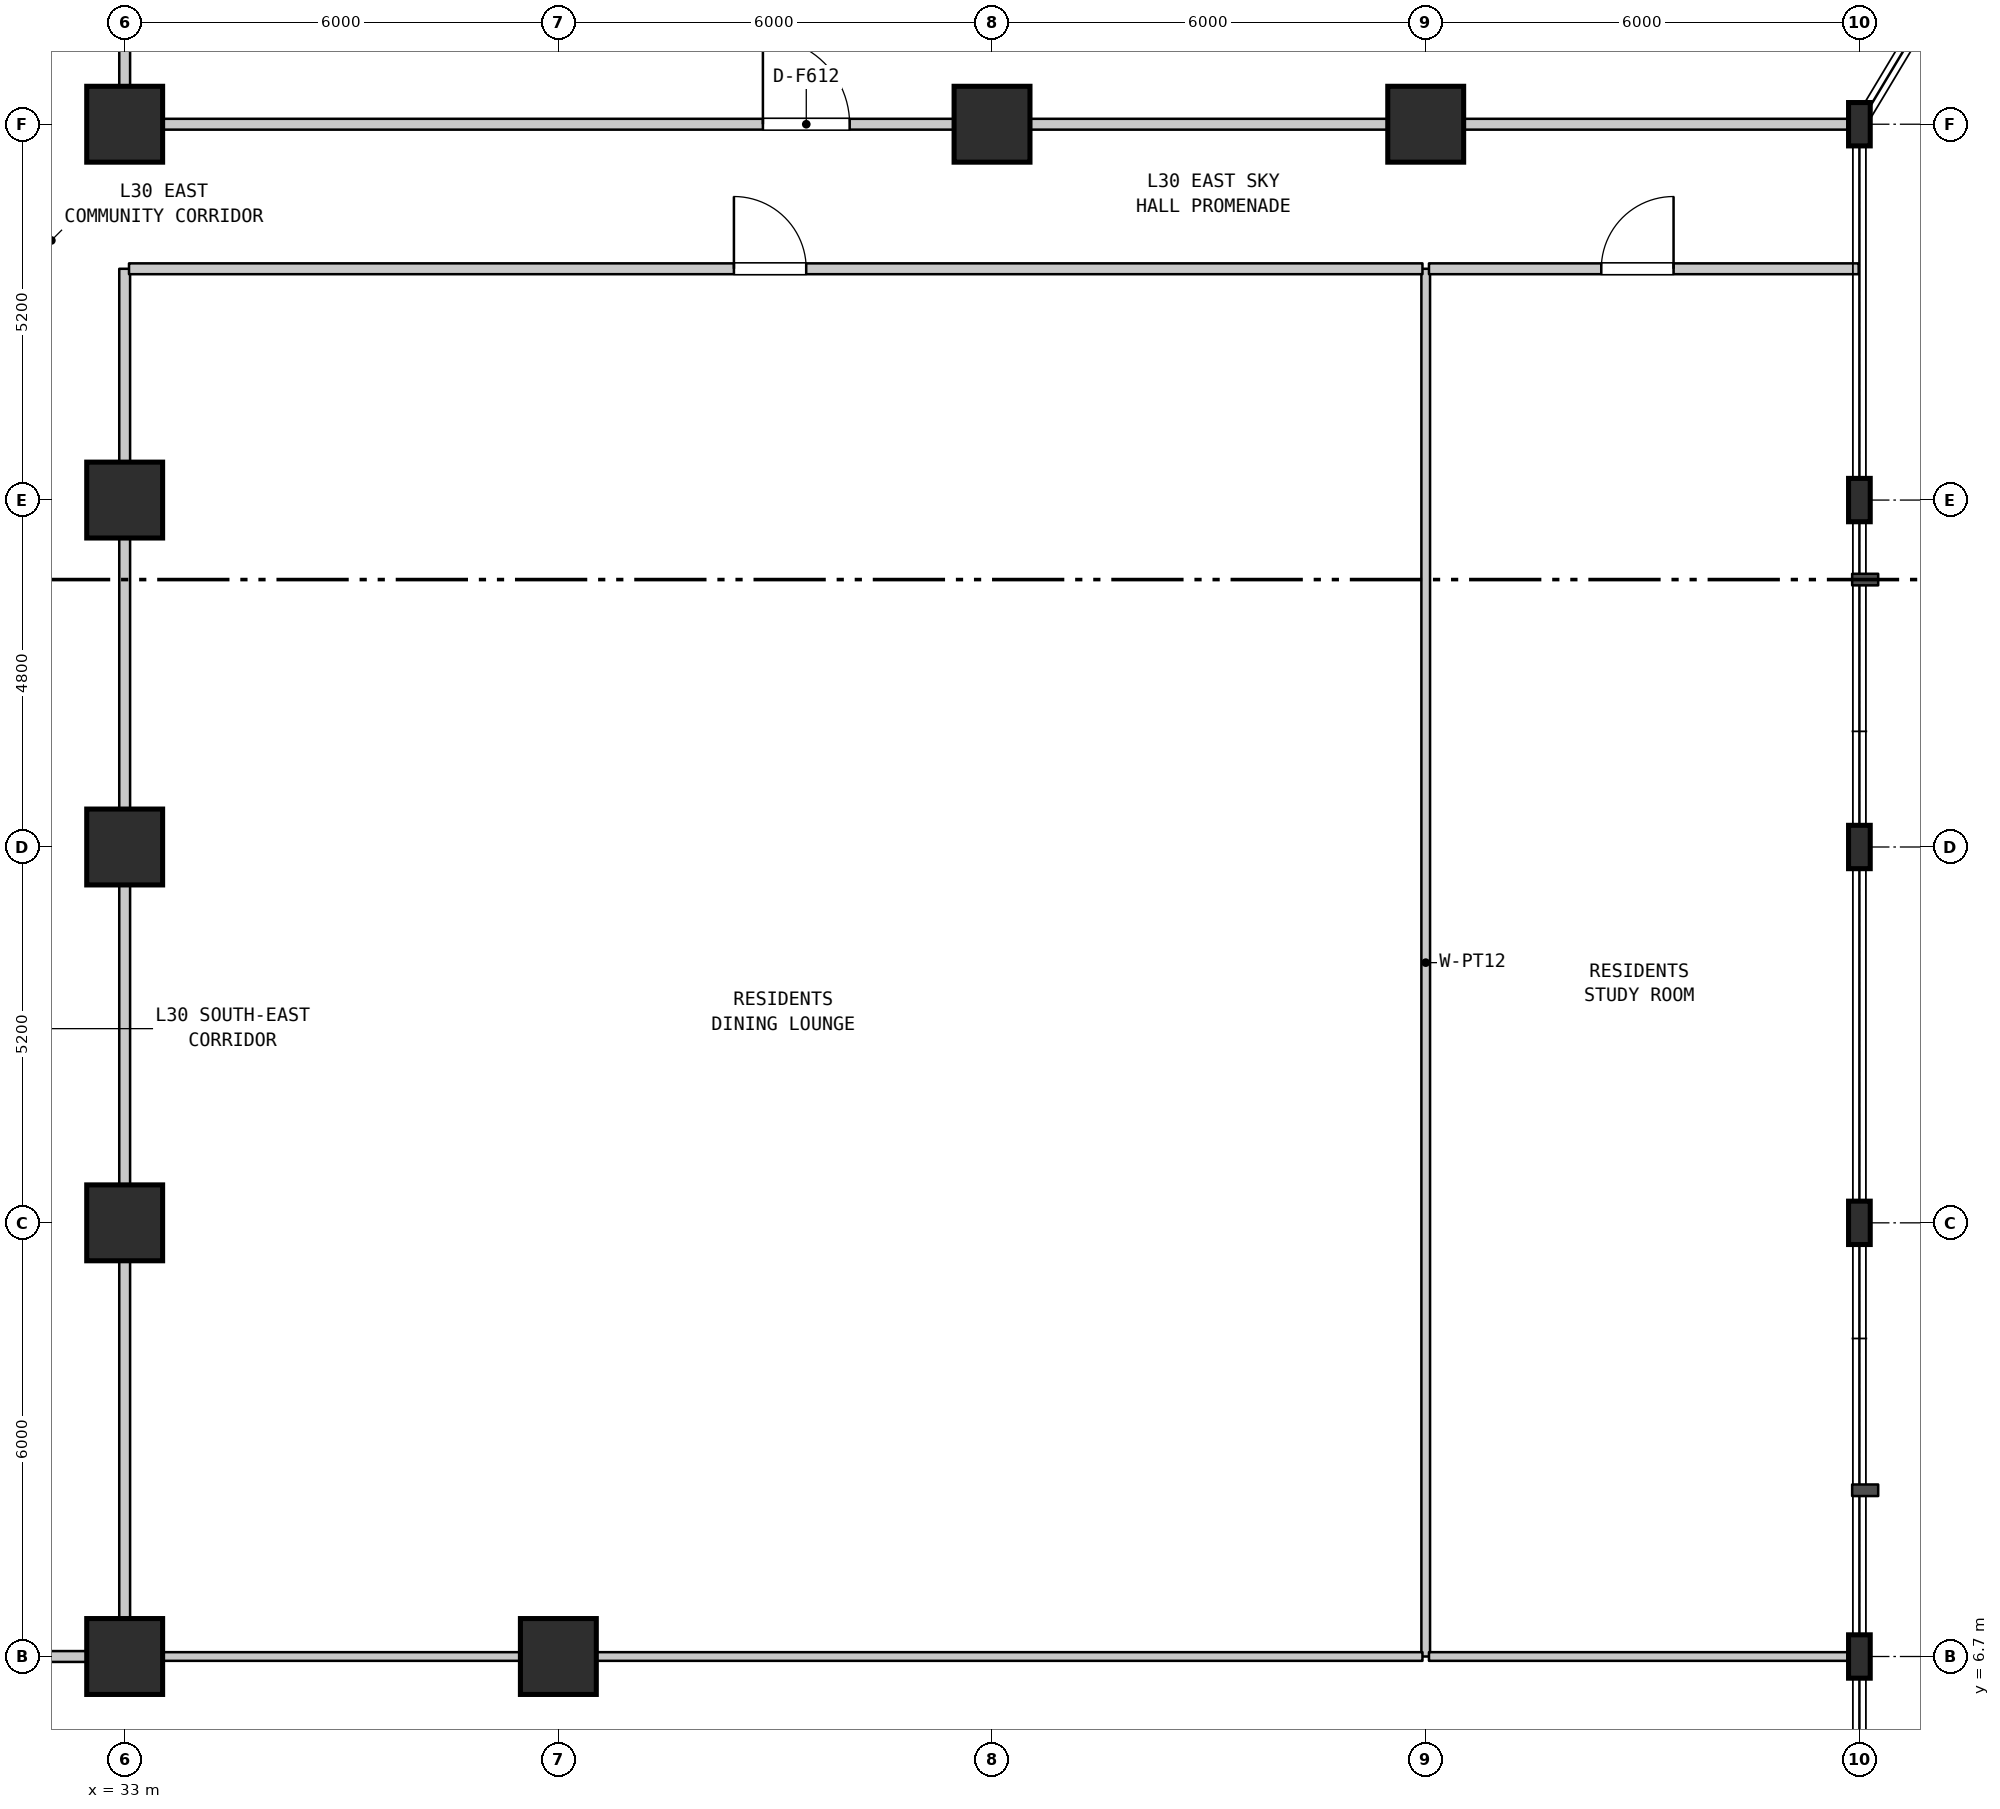
"""IFC4 building model, lengths in metres.
Left out: names, types, materials, properties, quantities, classifications, styles, units other than length and angle.
Written with IfcOpenShell. Run it as: python <this file> out.ifc"""

import sys

from ifc_helpers import new_model, si_unit, direction, frame, frame_2d, origin, origin_2d, place, context, subcontext, project, spatial, rectangle, i_section, extrude, element, fill, save


model = new_model("IFC4")
c1 = context("Model", 3, precision=1e-05, world=origin(), true_north=direction((0.0, 1.0)))
c2 = subcontext(c1, "Body", "Model", "MODEL_VIEW")
j1 = project(units=[si_unit("LENGTHUNIT", "METRE"), si_unit("PLANEANGLEUNIT", "RADIAN")], contexts=[c1])
p1 = place(None, origin())
s1 = spatial("IfcSite", under=j1, at=p1, CompositionType="ELEMENT")
p2 = place(p1, origin())
s2 = spatial("IfcBuilding", under=s1, at=p2, CompositionType="ELEMENT")
p3 = place(p2, frame((0.0, 0.0, 125.3)))
s3 = spatial("IfcBuildingStorey", under=s2, at=p3, CompositionType="ELEMENT", Elevation=125.3)
for number, where, z_axis, x_axis in (
    (1, (33.0, 6.7, 0.0), (0.0, 0.0, 1.0), (1.0, 0.0, 0.0)),
    (2, (33.0, 12.7, 0.0), (0.0, 0.0, 1.0), (1.0, 0.0, 0.0)),
    (3, (33.0, 17.9, 0.0), (0.0, 0.0, 1.0), (1.0, 0.0, 0.0)),
    (4, (33.0, 22.7, 0.0), (0.0, 0.0, 1.0), (1.0, 0.0, 0.0)),
    (5, (33.0, 27.9, 0.0), (0.0, 0.0, 1.0), (1.0, 0.0, 0.0)),
    (6, (39.0, 6.7, 0.0), (0.0, 0.0, 1.0), (1.0, 0.0, 0.0)),
    (7, (45.0, 27.9, 0.0), (0.0, 0.0, 1.0), (1.0, 0.0, 0.0)),
    (8, (51.0, 27.9, 0.0), (0.0, 0.0, 1.0), (1.0, 0.0, 0.0)),
):
    element("IfcColumn", number, at=place(p3, frame(where, z_axis=z_axis, x_axis=x_axis)), inside=s3, PredefinedType="COLUMN", context=c2, shape_type="SweptSolid", body=[
        extrude(rectangle(XDim=1.05, YDim=1.05, at=origin_2d()), origin(), (0.0, 0.0, 1.0), 4.5),
    ])
for number, where, z_axis, x_axis in (
    (9, (57.0, 6.7, 0.0), (0.0, 0.0, 1.0), (1.0, 0.0, 0.0)),
    (10, (57.0, 12.7, 0.0), (0.0, 0.0, 1.0), (1.0, 0.0, 0.0)),
    (11, (57.0, 17.9, 0.0), (0.0, 0.0, 1.0), (1.0, 0.0, 0.0)),
    (12, (57.0, 22.7, 0.0), (0.0, 0.0, 1.0), (1.0, 0.0, 0.0)),
    (13, (57.0, 27.9, 0.0), (0.0, 0.0, 1.0), (1.0, 0.0, 0.0)),
):
    element("IfcColumn", number, at=place(p3, frame(where, z_axis=z_axis, x_axis=x_axis)), inside=s3, PredefinedType="COLUMN", context=c2, shape_type="SweptSolid", body=[
        extrude(i_section(OverallWidth=0.3, OverallDepth=0.6, WebThickness=0.015, FlangeThickness=0.03, FilletRadius=0.027, at=origin_2d()), origin(), (0.0, 0.0, 1.0), 4.5),
    ])
p4 = place(p3, frame((33.0, 6.7, 0.0), z_axis=(0.0, 0.0, 1.0), x_axis=(0.0, 1.0, 0.0)))
e14 = element("IfcWall", 14, at=p4, inside=s3, PredefinedType="STANDARD", context=c2, shape_type="SweptSolid", body=[
    extrude(rectangle(XDim=19.2, YDim=0.15, at=frame_2d((9.6, 0.0))), origin(), (0.0, 0.0, 1.0), 3.735),
])
p5 = place(p3, frame((33.0, 27.9, 0.0), z_axis=(0.0, 0.0, 1.0), x_axis=(0.0, 1.0, 0.0)))
e15 = element("IfcWall", 15, at=p5, inside=s3, PredefinedType="STANDARD", context=c2, shape_type="SweptSolid", body=[
    extrude(rectangle(XDim=10.0, YDim=0.15, at=frame_2d((5.0, 0.0))), origin(), (0.0, 0.0, 1.0), 3.685),
])
p6 = place(p3, frame((51.0, 6.7, 0.0), z_axis=(0.0, 0.0, 1.0), x_axis=(0.0, 1.0, 0.0)))
e16 = element("IfcWall", 16, at=p6, inside=s3, PredefinedType="PARTITIONING", context=c2, shape_type="SweptSolid", body=[
    extrude(rectangle(XDim=19.2, YDim=0.12, at=frame_2d((9.6, 0.0))), origin(), (0.0, 0.0, 1.0), 4.185),
])
p7 = place(p3, frame((21.01, 6.7, 0.0), z_axis=(0.0, 0.0, 1.0), x_axis=(1.0, 0.0, 0.0)))
e17 = element("IfcWall", 17, at=p7, inside=s3, PredefinedType="STANDARD", context=c2, shape_type="SweptSolid", body=[
    extrude(rectangle(XDim=11.93, YDim=0.15, at=frame_2d((5.965, 0.0))), origin(), (0.0, 0.0, 1.0), 3.735),
])
p8 = place(p7, frame((4.325, 0.0, 0.0)))
e18 = element("IfcOpeningElement", 18, at=p8, cuts=e17, PredefinedType="OPENING", context=c2, shape_type="SweptSolid", body=[
    extrude(rectangle(XDim=1.0, YDim=2.15, at=frame_2d((0.5, 1.075))), frame((0.0, 0.085, 0.0), z_axis=(0.0, -1.0, 0.0), x_axis=(1.0, 0.0, 0.0)), (0.0, 0.0, 1.0), 0.17),
])
p9 = place(p3, frame((33.06, 6.7, 0.0), z_axis=(0.0, 0.0, 1.0), x_axis=(1.0, 0.0, 0.0)))
e19 = element("IfcWall", 19, at=p9, inside=s3, PredefinedType="PARTITIONING", context=c2, shape_type="SweptSolid", body=[
    extrude(rectangle(XDim=5.94, YDim=0.12, at=frame_2d((2.97, 0.0))), origin(), (0.0, 0.0, 1.0), 3.735),
])
p10 = place(p3, frame((51.045, 6.7, 0.0), z_axis=(0.0, 0.0, 1.0), x_axis=(1.0, 0.0, 0.0)))
e20 = element("IfcWall", 20, at=p10, inside=s3, PredefinedType="PARTITIONING", context=c2, shape_type="SweptSolid", body=[
    extrude(rectangle(XDim=5.945, YDim=0.12, at=frame_2d((2.973, 0.0))), origin(), (0.0, 0.0, 1.0), 3.585),
])
p11 = place(p3, frame((33.06, 25.9, 0.0), z_axis=(0.0, 0.0, 1.0), x_axis=(1.0, 0.0, 0.0)))
e21 = element("IfcWall", 21, at=p11, inside=s3, PredefinedType="STANDARD", context=c2, shape_type="SweptSolid", body=[
    extrude(rectangle(XDim=17.895, YDim=0.15, at=frame_2d((8.948, 0.0))), origin(), (0.0, 0.0, 1.0), 4.185),
])
p12 = place(p11, frame((8.369, 0.0, 0.0)))
e22 = element("IfcOpeningElement", 22, at=p12, cuts=e21, PredefinedType="OPENING", context=c2, shape_type="SweptSolid", body=[
    extrude(rectangle(XDim=1.0, YDim=2.15, at=frame_2d((0.5, 1.075))), frame((0.0, 0.085, 0.0), z_axis=(0.0, -1.0, 0.0), x_axis=(1.0, 0.0, 0.0)), (0.0, 0.0, 1.0), 0.17),
])
p13 = place(p3, frame((51.045, 25.9, 0.0), z_axis=(0.0, 0.0, 1.0), x_axis=(1.0, 0.0, 0.0)))
e23 = element("IfcWall", 23, at=p13, inside=s3, PredefinedType="STANDARD", context=c2, shape_type="SweptSolid", body=[
    extrude(rectangle(XDim=5.945, YDim=0.15, at=frame_2d((2.973, 0.0))), origin(), (0.0, 0.0, 1.0), 4.185),
])
p14 = place(p13, frame((2.384, 0.0, 0.0)))
e24 = element("IfcOpeningElement", 24, at=p14, cuts=e23, PredefinedType="OPENING", context=c2, shape_type="SweptSolid", body=[
    extrude(rectangle(XDim=1.0, YDim=2.15, at=frame_2d((0.5, 1.075))), frame((0.0, 0.085, 0.0), z_axis=(0.0, -1.0, 0.0), x_axis=(1.0, 0.0, 0.0)), (0.0, 0.0, 1.0), 0.17),
])
p15 = place(p3, frame((33.06, 27.9, 0.0), z_axis=(0.0, 0.0, 1.0), x_axis=(1.0, 0.0, 0.0)))
e25 = element("IfcWall", 25, at=p15, inside=s3, PredefinedType="STANDARD", context=c2, shape_type="SweptSolid", body=[
    extrude(rectangle(XDim=11.94, YDim=0.15, at=frame_2d((5.97, 0.0))), origin(), (0.0, 0.0, 1.0), 3.685),
])
p16 = place(p15, frame((8.77, 0.0, 0.0)))
e26 = element("IfcOpeningElement", 26, at=p16, cuts=e25, PredefinedType="OPENING", context=c2, shape_type="SweptSolid", body=[
    extrude(rectangle(XDim=1.2, YDim=2.2, at=frame_2d((0.6, 1.1))), frame((0.0, 0.085, 0.0), z_axis=(0.0, -1.0, 0.0), x_axis=(1.0, 0.0, 0.0)), (0.0, 0.0, 1.0), 0.17),
])
p17 = place(p3, frame((39.0, 6.7, 0.0), z_axis=(0.0, 0.0, 1.0), x_axis=(1.0, 0.0, 0.0)))
e27 = element("IfcWall", 27, at=p17, inside=s3, PredefinedType="PARTITIONING", context=c2, shape_type="SweptSolid", body=[
    extrude(rectangle(XDim=11.955, YDim=0.12, at=frame_2d((5.978, 0.0))), origin(), (0.0, 0.0, 1.0), 3.585),
])
p18 = place(p3, frame((45.0, 27.9, 0.0), z_axis=(0.0, 0.0, 1.0), x_axis=(1.0, 0.0, 0.0)))
e28 = element("IfcWall", 28, at=p18, inside=s3, PredefinedType="STANDARD", context=c2, shape_type="SweptSolid", body=[
    extrude(rectangle(XDim=11.99, YDim=0.15, at=frame_2d((5.995, 0.0))), origin(), (0.0, 0.0, 1.0), 3.735),
])
p19 = place(p12, origin())
e29 = element("IfcDoor", 29, at=p19, inside=s3, OperationType="SINGLE_SWING_LEFT", PredefinedType="DOOR", context=c2, shape_type="SweptSolid", body=[
    extrude(rectangle(XDim=1.0, YDim=2.15, at=frame_2d((0.5, 1.075))), frame((0.0, 0.025, 0.0), z_axis=(0.0, -1.0, 0.0), x_axis=(1.0, 0.0, 0.0)), (0.0, 0.0, 1.0), 0.05),
])
fill(e22, e29)
p20 = place(p14, origin())
e30 = element("IfcDoor", 30, at=p20, inside=s3, OperationType="SINGLE_SWING_RIGHT", PredefinedType="DOOR", context=c2, shape_type="SweptSolid", body=[
    extrude(rectangle(XDim=1.0, YDim=2.15, at=frame_2d((0.5, 1.075))), frame((0.0, 0.025, 0.0), z_axis=(0.0, -1.0, 0.0), x_axis=(1.0, 0.0, 0.0)), (0.0, 0.0, 1.0), 0.05),
])
fill(e24, e30)
p21 = place(p16, origin())
e31 = element("IfcDoor", 31, at=p21, inside=s3, OperationType="SINGLE_SWING_LEFT", PredefinedType="DOOR", context=c2, shape_type="SweptSolid", body=[
    extrude(rectangle(XDim=1.2, YDim=2.2, at=frame_2d((0.6, 1.1))), frame((0.0, 0.025, 0.0), z_axis=(0.0, -1.0, 0.0), x_axis=(1.0, 0.0, 0.0)), (0.0, 0.0, 1.0), 0.05),
])
fill(e26, e31)
save(model, sys.argv[1])
